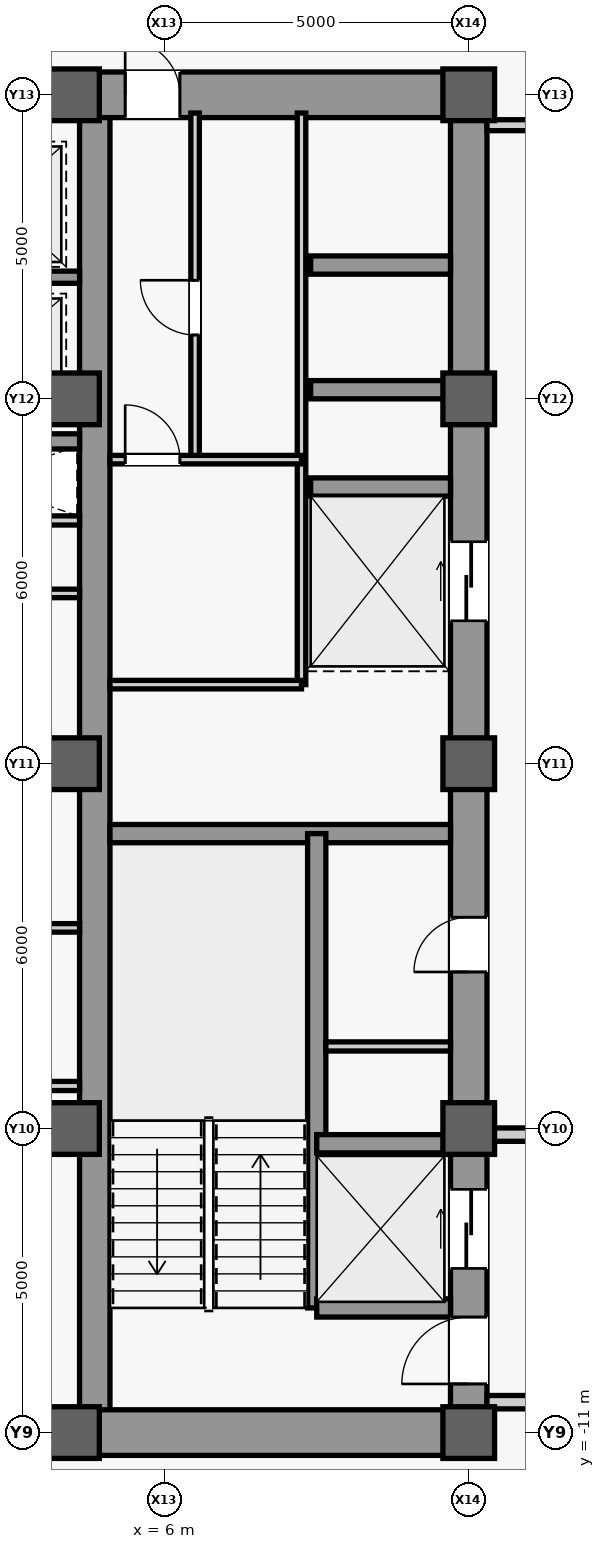
"""IFC4 building model, lengths in metres.
Left out: names, types, materials, properties, quantities, classifications, styles, units other than length and angle.
Written with IfcOpenShell. Run it as: python <this file> out.ifc"""

import sys

from ifc_helpers import new_model, si_unit, direction, frame, frame_2d, origin, origin_2d, place, context, subcontext, project, spatial, rectangle, extrude, source, transform, mapped, element, fill, save


model = new_model("IFC4")
c1 = context("Model", 3, precision=1e-05, world=origin(), true_north=direction((0.0, 1.0)))
c2 = subcontext(c1, "Body", "Model", "MODEL_VIEW")
j1 = project(units=[si_unit("LENGTHUNIT", "METRE"), si_unit("PLANEANGLEUNIT", "RADIAN")], contexts=[c1])
p1 = place(None, origin())
s1 = spatial("IfcSite", under=j1, at=p1, CompositionType="ELEMENT")
p2 = place(p1, origin())
s2 = spatial("IfcBuilding", under=s1, at=p2, CompositionType="ELEMENT")
p3 = place(p2, frame((0.0, 0.0, 203.1)))
s3 = spatial("IfcBuildingStorey", under=s2, at=p3, CompositionType="ELEMENT", Elevation=203.1)
m1 = source(origin(), c2, "Body", "SweptSolid", [
    extrude(rectangle(XDim=22.0, YDim=0.6, at=frame_2d((11.0, 0.0))), origin(), (0.0, 0.0, 1.0), 3.78),
])
p4 = place(p3, frame((11.0, -11.0, 0.0), z_axis=(0.0, 0.0, 1.0), x_axis=(0.0, 1.0, 0.0)))
e1 = element("IfcWall", 1, at=p4, inside=s3, PredefinedType="SHEAR", context=c2, shape_type="MappedRepresentation", body=[
    mapped(m1, transform((0.0, 0.0, 0.0), scale=1.0)),
])
m2 = source(origin(), c2, "Body", "SweptSolid", [
    extrude(rectangle(XDim=1.1, YDim=2.2, at=frame_2d((0.55, 1.1))), frame((0.0, 0.31, 0.0), z_axis=(0.0, -1.0, 0.0), x_axis=(1.0, 0.0, 0.0)), (0.0, 0.0, 1.0), 0.62),
])
p5 = place(p4, frame((0.8, 0.0, 0.0)))
e2 = element("IfcOpeningElement", 2, at=p5, cuts=e1, PredefinedType="OPENING", context=c2, shape_type="MappedRepresentation", body=[
    mapped(m2, transform((0.0, 0.0, 0.0), scale=1.0)),
])
m3 = source(origin(), c2, "Body", "SweptSolid", [
    extrude(rectangle(XDim=0.9, YDim=2.15, at=frame_2d((0.45, 1.075))), frame((0.0, 0.31, 0.0), z_axis=(0.0, -1.0, 0.0), x_axis=(1.0, 0.0, 0.0)), (0.0, 0.0, 1.0), 0.62),
])
p6 = place(p4, frame((7.575, 0.0, 0.0)))
e3 = element("IfcOpeningElement", 3, at=p6, cuts=e1, PredefinedType="OPENING", context=c2, shape_type="MappedRepresentation", body=[
    mapped(m3, transform((0.0, 0.0, 0.0), scale=1.0)),
])
m4 = source(origin(), c2, "Body", "SweptSolid", [
    extrude(rectangle(XDim=1.3, YDim=2.3, at=frame_2d((0.65, 1.15))), frame((0.0, 0.31, 0.0), z_axis=(0.0, -1.0, 0.0), x_axis=(1.0, 0.0, 0.0)), (0.0, 0.0, 1.0), 0.62),
])
p7 = place(p4, frame((2.7, 0.0, 0.0)))
e4 = element("IfcOpeningElement", 4, at=p7, cuts=e1, PredefinedType="OPENING", context=c2, shape_type="MappedRepresentation", body=[
    mapped(m4, transform((0.0, 0.0, 0.0), scale=1.0)),
])
p8 = place(p4, frame((13.35, 0.0, 0.0)))
e5 = element("IfcOpeningElement", 5, at=p8, cuts=e1, PredefinedType="OPENING", context=c2, shape_type="MappedRepresentation", body=[
    mapped(m4, transform((0.0, 0.0, 0.0), scale=1.0)),
])
m5 = source(origin(), c2, "Body", "SweptSolid", [
    extrude(rectangle(XDim=21.4, YDim=0.5, at=frame_2d((10.7, 0.0))), origin(), (0.0, 0.0, 1.0), 3.78),
])
p9 = place(p3, frame((4.85, -10.7, 0.0), z_axis=(0.0, 0.0, 1.0), x_axis=(0.0, 1.0, 0.0)))
e6 = element("IfcWall", 6, at=p9, inside=s3, PredefinedType="SHEAR", context=c2, shape_type="MappedRepresentation", body=[
    mapped(m5, transform((0.0, 0.0, 0.0), scale=1.0)),
])
m6 = source(origin(), c2, "Body", "SweptSolid", [
    extrude(rectangle(XDim=5.85, YDim=0.75, at=frame_2d((2.925, 0.0))), origin(), (0.0, 0.0, 1.0), 3.78),
])
p10 = place(p3, frame((4.85, -11.0, 0.0), z_axis=(0.0, 0.0, 1.0), x_axis=(1.0, 0.0, 0.0)))
e7 = element("IfcWall", 7, at=p10, inside=s3, PredefinedType="SHEAR", context=c2, shape_type="MappedRepresentation", body=[
    mapped(m6, transform((0.0, 0.0, 0.0), scale=1.0)),
])
p11 = place(p3, frame((4.85, 11.0, 0.0), z_axis=(0.0, 0.0, 1.0), x_axis=(1.0, 0.0, 0.0)))
e8 = element("IfcWall", 8, at=p11, inside=s3, PredefinedType="SHEAR", context=c2, shape_type="MappedRepresentation", body=[
    mapped(m6, transform((0.0, 0.0, 0.0), scale=1.0)),
])
m7 = source(origin(), c2, "Body", "SweptSolid", [
    extrude(rectangle(XDim=0.9, YDim=2.15, at=frame_2d((0.45, 1.075))), frame((0.0, 0.385, 0.0), z_axis=(0.0, -1.0, 0.0), x_axis=(1.0, 0.0, 0.0)), (0.0, 0.0, 1.0), 0.77),
])
p12 = place(p11, frame((0.5, 0.0, 0.0)))
e9 = element("IfcOpeningElement", 9, at=p12, cuts=e8, PredefinedType="OPENING", context=c2, shape_type="MappedRepresentation", body=[
    mapped(m7, transform((0.0, 0.0, 0.0), scale=1.0)),
])
m8 = source(origin(), c2, "Body", "SweptSolid", [
    extrude(rectangle(XDim=5.6, YDim=0.3, at=frame_2d((2.8, 0.0))), origin(), (0.0, 0.0, 1.0), 3.78),
])
p13 = place(p3, frame((5.1, -1.15, 0.0), z_axis=(0.0, 0.0, 1.0), x_axis=(1.0, 0.0, 0.0)))
e10 = element("IfcWall", 10, at=p13, inside=s3, PredefinedType="SHEAR", context=c2, shape_type="MappedRepresentation", body=[
    mapped(m8, transform((0.0, 0.0, 0.0), scale=1.0)),
])
m9 = source(origin(), c2, "Body", "SweptSolid", [
    extrude(rectangle(XDim=9.2, YDim=0.5, at=frame_2d((4.6, 0.0))), origin(), (0.0, 0.0, 1.0), 3.78),
])
p14 = place(p3, frame((-4.6, -11.0, 0.0), z_axis=(0.0, 0.0, 1.0), x_axis=(1.0, 0.0, 0.0)))
e11 = element("IfcWall", 11, at=p14, inside=s3, PredefinedType="SHEAR", context=c2, shape_type="MappedRepresentation", body=[
    mapped(m9, transform((0.0, 0.0, 0.0), scale=1.0)),
])
m10 = source(origin(), c2, "Body", "SweptSolid", [
    extrude(rectangle(XDim=1.8, YDim=2.25, at=frame_2d((0.9, 1.125))), frame((0.0, 0.26, 0.0), z_axis=(0.0, -1.0, 0.0), x_axis=(1.0, 0.0, 0.0)), (0.0, 0.0, 1.0), 0.52),
])
p15 = place(p14, frame((3.7, 0.0, 0.0)))
e12 = element("IfcOpeningElement", 12, at=p15, cuts=e11, PredefinedType="OPENING", context=c2, shape_type="MappedRepresentation", body=[
    mapped(m10, transform((0.0, 0.0, 0.0), scale=1.0)),
])
p16 = place(p3, frame((-4.6, 11.0, 0.0), z_axis=(0.0, 0.0, 1.0), x_axis=(1.0, 0.0, 0.0)))
e13 = element("IfcWall", 13, at=p16, inside=s3, PredefinedType="SHEAR", context=c2, shape_type="MappedRepresentation", body=[
    mapped(m9, transform((0.0, 0.0, 0.0), scale=1.0)),
])
p17 = place(p16, frame((3.7, 0.0, 0.0)))
e14 = element("IfcOpeningElement", 14, at=p17, cuts=e13, PredefinedType="OPENING", context=c2, shape_type="MappedRepresentation", body=[
    mapped(m10, transform((0.0, 0.0, 0.0), scale=1.0)),
])
m11 = source(origin(), c2, "Body", "SweptSolid", [
    extrude(rectangle(XDim=0.85, YDim=0.85, at=origin_2d()), origin(), (0.0, 0.0, 1.0), 4.0),
])
for number, where, z_axis, x_axis in (
    (15, (4.5, -11.0, 0.0), (0.0, 0.0, 1.0), (1.0, 0.0, 0.0)),
    (16, (4.5, -6.0, 0.0), (0.0, 0.0, 1.0), (1.0, 0.0, 0.0)),
    (17, (4.5, 0.0, 0.0), (0.0, 0.0, 1.0), (1.0, 0.0, 0.0)),
    (18, (4.5, 6.0, 0.0), (0.0, 0.0, 1.0), (1.0, 0.0, 0.0)),
    (19, (4.5, 11.0, 0.0), (0.0, 0.0, 1.0), (1.0, 0.0, 0.0)),
    (20, (11.0, -11.0, 0.0), (0.0, 0.0, 1.0), (1.0, 0.0, 0.0)),
    (21, (11.0, -6.0, 0.0), (0.0, 0.0, 1.0), (1.0, 0.0, 0.0)),
    (22, (11.0, 0.0, 0.0), (0.0, 0.0, 1.0), (1.0, 0.0, 0.0)),
    (23, (11.0, 6.0, 0.0), (0.0, 0.0, 1.0), (1.0, 0.0, 0.0)),
    (24, (11.0, 11.0, 0.0), (0.0, 0.0, 1.0), (1.0, 0.0, 0.0)),
):
    element("IfcColumn", number, at=place(p3, frame(where, z_axis=z_axis, x_axis=x_axis)), inside=s3, PredefinedType="COLUMN", context=c2, shape_type="MappedRepresentation", body=[
        mapped(m11, transform((0.0, 0.0, 0.0), scale=1.0)),
    ])
m12 = source(origin(), c2, "Body", "SweptSolid", [
    extrude(rectangle(XDim=7.8, YDim=0.3, at=frame_2d((3.9, 0.0))), origin(), (0.0, 0.0, 1.0), 3.78),
])
p18 = place(p3, frame((8.5, -8.95, 0.0), z_axis=(0.0, 0.0, 1.0), x_axis=(0.0, 1.0, 0.0)))
e25 = element("IfcWall", 25, at=p18, inside=s3, PredefinedType="SHEAR", context=c2, shape_type="MappedRepresentation", body=[
    mapped(m12, transform((0.0, 0.0, 0.0), scale=1.0)),
])
m13 = source(origin(), c2, "Body", "SweptSolid", [
    extrude(rectangle(XDim=2.2, YDim=0.3, at=frame_2d((1.1, 0.0))), origin(), (0.0, 0.0, 1.0), 3.78),
])
for number, where, z_axis, x_axis in (
    (26, (8.5, -8.95, 0.0), (0.0, 0.0, 1.0), (1.0, 0.0, 0.0)),
    (27, (8.5, -6.25, 0.0), (0.0, 0.0, 1.0), (1.0, 0.0, 0.0)),
):
    element("IfcWall", number, at=place(p3, frame(where, z_axis=z_axis, x_axis=x_axis)), inside=s3, PredefinedType="SHEAR", context=c2, shape_type="MappedRepresentation", body=[
        mapped(m13, transform((0.0, 0.0, 0.0), scale=1.0)),
    ])
m14 = source(origin(), c2, "Body", "SweptSolid", [
    extrude(rectangle(XDim=2.3, YDim=0.3, at=frame_2d((1.15, 0.0))), origin(), (0.0, 0.0, 1.0), 3.78),
])
for number, where, z_axis, x_axis in (
    (28, (8.4, 4.55, 0.0), (0.0, 0.0, 1.0), (1.0, 0.0, 0.0)),
    (29, (8.4, 6.15, 0.0), (0.0, 0.0, 1.0), (1.0, 0.0, 0.0)),
    (30, (8.4, 8.2, 0.0), (0.0, 0.0, 1.0), (1.0, 0.0, 0.0)),
):
    element("IfcWall", number, at=place(p3, frame(where, z_axis=z_axis, x_axis=x_axis)), inside=s3, PredefinedType="SHEAR", context=c2, shape_type="MappedRepresentation", body=[
        mapped(m14, transform((0.0, 0.0, 0.0), scale=1.0)),
    ])
m15 = source(origin(), c2, "Body", "SweptSolid", [
    extrude(rectangle(XDim=2.05, YDim=0.15, at=frame_2d((1.025, 0.0))), origin(), (0.0, 0.0, 1.0), 3.78),
])
p19 = place(p3, frame((8.65, -4.65, 0.0), z_axis=(0.0, 0.0, 1.0), x_axis=(1.0, 0.0, 0.0)))
e31 = element("IfcWall", 31, at=p19, inside=s3, PredefinedType="PARTITIONING", context=c2, shape_type="MappedRepresentation", body=[
    mapped(m15, transform((0.0, 0.0, 0.0), scale=1.0)),
])
m16 = source(origin(), c2, "Body", "SweptSolid", [
    extrude(rectangle(XDim=9.4, YDim=0.14, at=frame_2d((4.7, 0.0))), origin(), (0.0, 0.0, 1.0), 3.78),
])
p20 = place(p3, frame((8.25, 1.3, 0.0), z_axis=(0.0, 0.0, 1.0), x_axis=(0.0, 1.0, 0.0)))
e32 = element("IfcWall", 32, at=p20, inside=s3, PredefinedType="PARTITIONING", context=c2, shape_type="MappedRepresentation", body=[
    mapped(m16, transform((0.0, 0.0, 0.0), scale=1.0)),
])
m17 = source(origin(), c2, "Body", "SweptSolid", [
    extrude(rectangle(XDim=3.15, YDim=0.14, at=frame_2d((1.575, 0.0))), origin(), (0.0, 0.0, 1.0), 3.78),
])
p21 = place(p3, frame((5.1, 1.3, 0.0), z_axis=(0.0, 0.0, 1.0), x_axis=(1.0, 0.0, 0.0)))
e33 = element("IfcWall", 33, at=p21, inside=s3, PredefinedType="PARTITIONING", context=c2, shape_type="MappedRepresentation", body=[
    mapped(m17, transform((0.0, 0.0, 0.0), scale=1.0)),
])
m18 = source(origin(), c2, "Body", "SweptSolid", [
    extrude(rectangle(XDim=5.7, YDim=0.14, at=frame_2d((2.85, 0.0))), origin(), (0.0, 0.0, 1.0), 3.78),
])
p22 = place(p3, frame((6.5, 5.0, 0.0), z_axis=(0.0, 0.0, 1.0), x_axis=(0.0, 1.0, 0.0)))
e34 = element("IfcWall", 34, at=p22, inside=s3, PredefinedType="PARTITIONING", context=c2, shape_type="MappedRepresentation", body=[
    mapped(m18, transform((0.0, 0.0, 0.0), scale=1.0)),
])
m19 = source(origin(), c2, "Body", "SweptSolid", [
    extrude(rectangle(XDim=0.9, YDim=2.15, at=frame_2d((0.45, 1.075))), frame((0.0, 0.08, 0.0), z_axis=(0.0, -1.0, 0.0), x_axis=(1.0, 0.0, 0.0)), (0.0, 0.0, 1.0), 0.16),
])
p23 = place(p22, frame((2.05, 0.0, 0.0)))
e35 = element("IfcOpeningElement", 35, at=p23, cuts=e34, PredefinedType="OPENING", context=c2, shape_type="MappedRepresentation", body=[
    mapped(m19, transform((0.0, 0.0, 0.0), scale=1.0)),
])
p24 = place(p3, frame((5.1, 5.0, 0.0), z_axis=(0.0, 0.0, 1.0), x_axis=(1.0, 0.0, 0.0)))
e36 = element("IfcWall", 36, at=p24, inside=s3, PredefinedType="PARTITIONING", context=c2, shape_type="MappedRepresentation", body=[
    mapped(m17, transform((0.0, 0.0, 0.0), scale=1.0)),
])
p25 = place(p24, frame((0.25, 0.0, 0.0)))
e37 = element("IfcOpeningElement", 37, at=p25, cuts=e36, PredefinedType="OPENING", context=c2, shape_type="MappedRepresentation", body=[
    mapped(m19, transform((0.0, 0.0, 0.0), scale=1.0)),
])
m20 = source(origin(), c2, "Body", "SweptSolid", [
    extrude(rectangle(XDim=4.05, YDim=0.22, at=frame_2d((2.025, 0.0))), origin(), (0.0, 0.0, 1.0), 3.78),
])
p26 = place(p3, frame((11.3, -10.5, 0.0), z_axis=(0.0, 0.0, 1.0), x_axis=(1.0, 0.0, 0.0)))
e38 = element("IfcWall", 38, at=p26, inside=s3, PredefinedType="PARTITIONING", context=c2, shape_type="MappedRepresentation", body=[
    mapped(m20, transform((0.0, 0.0, 0.0), scale=1.0)),
])
m21 = source(origin(), c2, "Body", "SweptSolid", [
    extrude(rectangle(XDim=4.05, YDim=0.22, at=frame_2d((2.025, 0.0))), origin(), (0.0, 0.0, 1.0), 3.007),
])
p27 = place(p3, frame((11.3, -6.1, 0.0), z_axis=(0.0, 0.0, 1.0), x_axis=(1.0, 0.0, 0.0)))
e39 = element("IfcWall", 39, at=p27, inside=s3, PredefinedType="PARTITIONING", context=c2, shape_type="MappedRepresentation", body=[
    mapped(m21, transform((0.0, 0.0, 0.0), scale=1.0)),
])
m22 = source(origin(), c2, "Body", "SweptSolid", [
    extrude(rectangle(XDim=4.05, YDim=0.18, at=frame_2d((2.025, 0.0))), origin(), (0.0, 0.0, 1.0), 3.78),
])
p28 = place(p3, frame((11.3, 10.5, 0.0), z_axis=(0.0, 0.0, 1.0), x_axis=(1.0, 0.0, 0.0)))
e40 = element("IfcWall", 40, at=p28, inside=s3, PredefinedType="PARTITIONING", context=c2, shape_type="MappedRepresentation", body=[
    mapped(m22, transform((0.0, 0.0, 0.0), scale=1.0)),
])
m23 = source(origin(), c2, "Body", "SweptSolid", [
    extrude(rectangle(XDim=3.45, YDim=0.15, at=frame_2d((1.725, 0.0))), origin(), (0.0, 0.0, 1.0), 3.78),
])
for number, where, z_axis, x_axis in (
    (41, (1.15, 4.0, 0.0), (0.0, 0.0, 1.0), (1.0, 0.0, 0.0)),
    (42, (1.15, -5.3, 0.0), (0.0, 0.0, 1.0), (1.0, 0.0, 0.0)),
):
    element("IfcWall", number, at=place(p3, frame(where, z_axis=z_axis, x_axis=x_axis)), inside=s3, PredefinedType="PARTITIONING", context=c2, shape_type="MappedRepresentation", body=[
        mapped(m23, transform((0.0, 0.0, 0.0), scale=1.0)),
    ])
m24 = source(origin(), c2, "Body", "SweptSolid", [
    extrude(rectangle(XDim=2.45, YDim=0.2, at=frame_2d((1.225, 0.0))), origin(), (0.0, 0.0, 1.0), 3.78),
])
p29 = place(p3, frame((2.15, 8.0, 0.0), z_axis=(0.0, 0.0, 1.0), x_axis=(1.0, 0.0, 0.0)))
e43 = element("IfcWall", 43, at=p29, inside=s3, PredefinedType="SHEAR", context=c2, shape_type="MappedRepresentation", body=[
    mapped(m24, transform((0.0, 0.0, 0.0), scale=1.0)),
])
m25 = source(origin(), c2, "Body", "SweptSolid", [
    extrude(rectangle(XDim=9.2, YDim=0.25, at=frame_2d((4.6, 0.0))), origin(), (0.0, 0.0, 1.0), 3.78),
])
p30 = place(p3, frame((-4.6, 5.3, 0.0), z_axis=(0.0, 0.0, 1.0), x_axis=(1.0, 0.0, 0.0)))
e44 = element("IfcWall", 44, at=p30, inside=s3, PredefinedType="SHEAR", context=c2, shape_type="MappedRepresentation", body=[
    mapped(m25, transform((0.0, 0.0, 0.0), scale=1.0)),
])
m26 = source(origin(), c2, "Body", "SweptSolid", [
    extrude(rectangle(XDim=1.05, YDim=2.2, at=frame_2d((0.525, 1.1))), frame((0.0, 0.135, 0.0), z_axis=(0.0, -1.0, 0.0), x_axis=(1.0, 0.0, 0.0)), (0.0, 0.0, 1.0), 0.27),
])
p31 = place(p30, frame((4.075, 0.0, 0.0)))
e45 = element("IfcOpeningElement", 45, at=p31, cuts=e44, PredefinedType="OPENING", context=c2, shape_type="MappedRepresentation", body=[
    mapped(m26, transform((0.0, 0.0, 0.0), scale=1.0)),
])
m27 = source(origin(), c2, "Body", "SweptSolid", [
    extrude(rectangle(XDim=3.45, YDim=0.14, at=frame_2d((1.725, 0.0))), origin(), (0.0, 0.0, 1.0), 3.78),
])
p32 = place(p3, frame((1.15, -2.7, 0.0), z_axis=(0.0, 0.0, 1.0), x_axis=(1.0, 0.0, 0.0)))
e46 = element("IfcWall", 46, at=p32, inside=s3, PredefinedType="PARTITIONING", context=c2, shape_type="MappedRepresentation", body=[
    mapped(m27, transform((0.0, 0.0, 0.0), scale=1.0)),
])
m28 = source(origin(), c2, "Body", "SweptSolid", [
    extrude(rectangle(XDim=3.45, YDim=0.14, at=frame_2d((1.725, 0.0))), origin(), (0.0, 0.0, 1.0), 3.085),
])
p33 = place(p3, frame((1.15, 0.1, 0.0), z_axis=(0.0, 0.0, 1.0), x_axis=(1.0, 0.0, 0.0)))
e47 = element("IfcWall", 47, at=p33, inside=s3, PredefinedType="PARTITIONING", context=c2, shape_type="MappedRepresentation", body=[
    mapped(m28, transform((0.0, 0.0, 0.0), scale=1.0)),
])
p34 = place(p3, frame((1.15, 2.8, 0.0), z_axis=(0.0, 0.0, 1.0), x_axis=(1.0, 0.0, 0.0)))
e48 = element("IfcWall", 48, at=p34, inside=s3, PredefinedType="PARTITIONING", context=c2, shape_type="MappedRepresentation", body=[
    mapped(m27, transform((0.0, 0.0, 0.0), scale=1.0)),
])
m29 = source(origin(), c2, "Body", "SweptSolid", [
    extrude(rectangle(XDim=1.1, YDim=2.2, at=frame_2d((0.55, 1.1))), frame((0.0, 0.025, 0.0), z_axis=(0.0, -1.0, 0.0), x_axis=(1.0, 0.0, 0.0)), (0.0, 0.0, 1.0), 0.05),
])
p35 = place(p5, origin())
e49 = element("IfcDoor", 49, at=p35, inside=s3, OperationType="SINGLE_SWING_LEFT", PredefinedType="DOOR", context=c2, shape_type="MappedRepresentation", body=[
    mapped(m29, transform((0.0, 0.0, 0.0), scale=1.0)),
])
fill(e2, e49)
m30 = source(origin(), c2, "Body", "SweptSolid", [
    extrude(rectangle(XDim=0.9, YDim=2.15, at=frame_2d((0.45, 1.075))), frame((0.0, 0.025, 0.0), z_axis=(0.0, -1.0, 0.0), x_axis=(1.0, 0.0, 0.0)), (0.0, 0.0, 1.0), 0.05),
])
p36 = place(p6, origin())
e50 = element("IfcDoor", 50, at=p36, inside=s3, OperationType="SINGLE_SWING_LEFT", PredefinedType="DOOR", context=c2, shape_type="MappedRepresentation", body=[
    mapped(m30, transform((0.0, 0.0, 0.0), scale=1.0)),
])
fill(e3, e50)
p37 = place(p12, origin())
e51 = element("IfcDoor", 51, at=p37, inside=s3, OperationType="SINGLE_SWING_LEFT", PredefinedType="DOOR", context=c2, shape_type="MappedRepresentation", body=[
    mapped(m30, transform((0.0, 0.0, 0.0), scale=1.0)),
])
fill(e9, e51)
p38 = place(p23, origin())
e52 = element("IfcDoor", 52, at=p38, inside=s3, OperationType="SINGLE_SWING_RIGHT", PredefinedType="DOOR", context=c2, shape_type="MappedRepresentation", body=[
    mapped(m30, transform((0.0, 0.0, 0.0), scale=1.0)),
])
fill(e35, e52)
p39 = place(p25, origin())
e53 = element("IfcDoor", 53, at=p39, inside=s3, OperationType="SINGLE_SWING_LEFT", PredefinedType="DOOR", context=c2, shape_type="MappedRepresentation", body=[
    mapped(m30, transform((0.0, 0.0, 0.0), scale=1.0)),
])
fill(e37, e53)
m31 = source(origin(), c2, "Body", "SweptSolid", [
    extrude(rectangle(XDim=1.3, YDim=2.3, at=frame_2d((0.65, 1.15))), frame((0.0, 0.025, 0.0), z_axis=(0.0, -1.0, 0.0), x_axis=(1.0, 0.0, 0.0)), (0.0, 0.0, 1.0), 0.05),
])
p40 = place(p7, origin())
e54 = element("IfcDoor", 54, at=p40, inside=s3, OperationType="SLIDING_TO_LEFT", PredefinedType="DOOR", context=c2, shape_type="MappedRepresentation", body=[
    mapped(m31, transform((0.0, 0.0, 0.0), scale=1.0)),
])
fill(e4, e54)
p41 = place(p8, origin())
e55 = element("IfcDoor", 55, at=p41, inside=s3, OperationType="SLIDING_TO_LEFT", PredefinedType="DOOR", context=c2, shape_type="MappedRepresentation", body=[
    mapped(m31, transform((0.0, 0.0, 0.0), scale=1.0)),
])
fill(e5, e55)
save(model, sys.argv[1])
